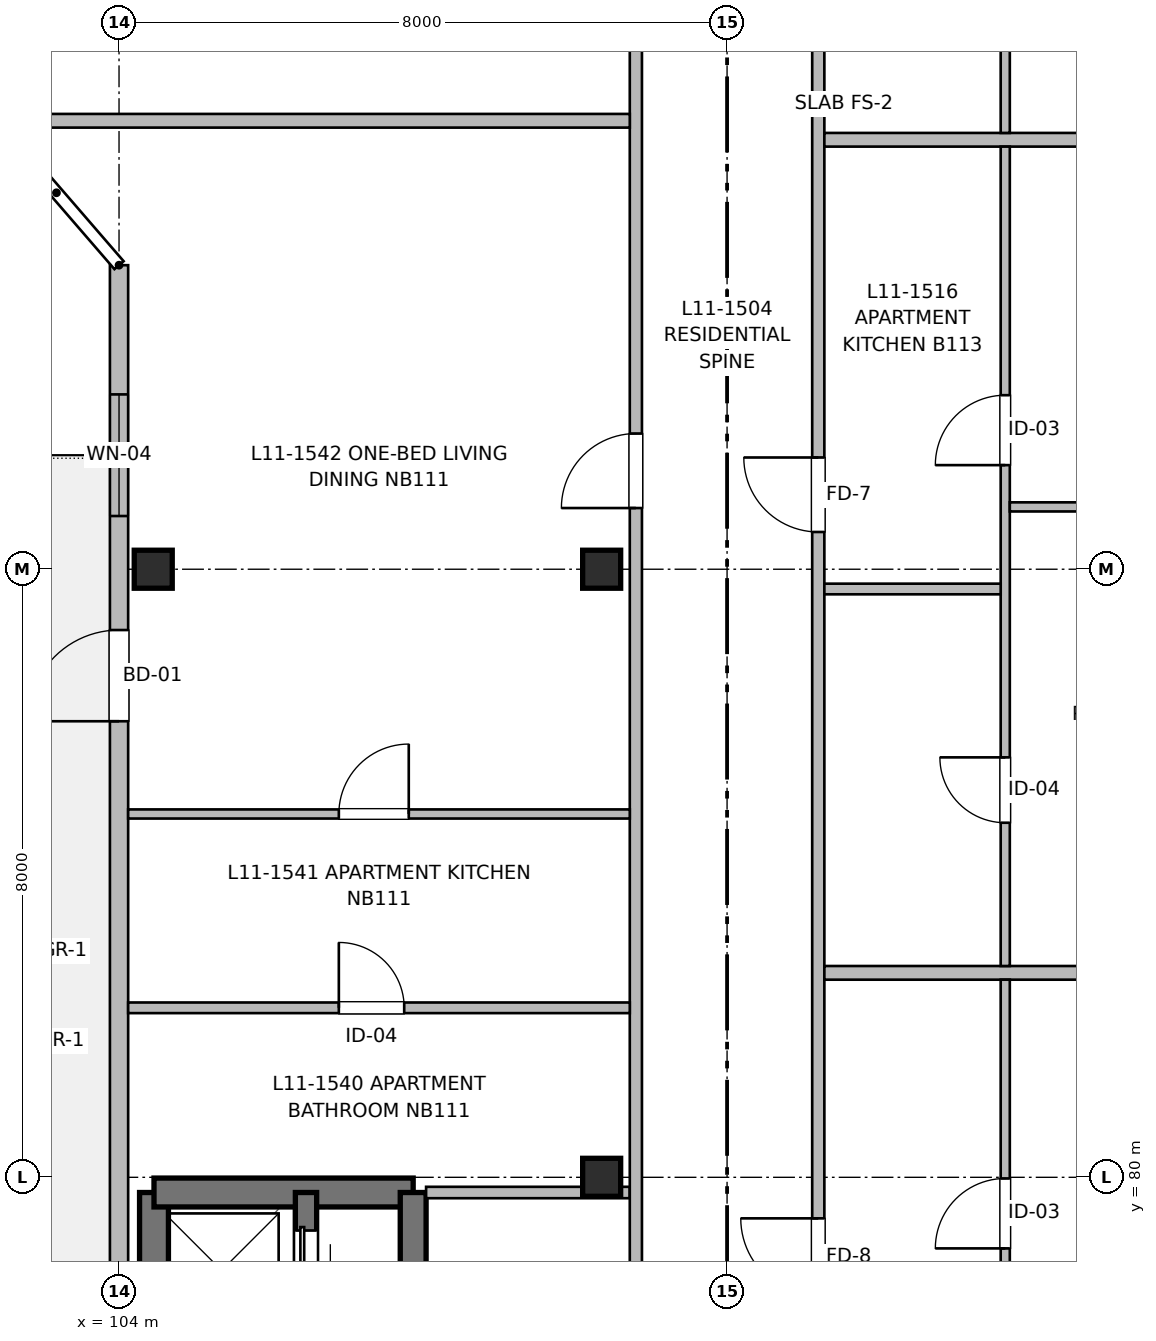
"""IFC4 building model, lengths in metres.
Left out: names, types, materials, properties, quantities, classifications, styles, units other than length and angle.
Written with IfcOpenShell. Run it as: python <this file> out.ifc"""

import sys

from ifc_helpers import new_model, si_unit, direction, frame, frame_2d, origin, origin_2d, place, context, subcontext, project, spatial, rectangle, extrude, element, fill, save


model = new_model("IFC4")
c1 = context("Model", 3, precision=1e-05, world=origin(), true_north=direction((0.0, 1.0)))
c2 = subcontext(c1, "Body", "Model", "MODEL_VIEW")
j1 = project(units=[si_unit("LENGTHUNIT", "METRE"), si_unit("PLANEANGLEUNIT", "RADIAN")], contexts=[c1])
p1 = place(None, origin())
s1 = spatial("IfcSite", under=j1, at=p1, CompositionType="ELEMENT")
p2 = place(p1, origin())
s2 = spatial("IfcBuilding", under=s1, at=p2, CompositionType="ELEMENT")
p3 = place(p2, frame((0.0, 0.0, 36.16)))
s3 = spatial("IfcBuildingStorey", under=s2, at=p3, CompositionType="ELEMENT", Elevation=36.16)
for number, where, z_axis, x_axis in (
    (1, (104.45, 88.0, 0.0), (0.0, 0.0, 1.0), (1.0, 0.0, 0.0)),
    (2, (110.35, 80.0, 0.0), (0.0, 0.0, 1.0), (1.0, 0.0, 0.0)),
    (3, (110.35, 88.0, 0.0), (0.0, 0.0, 1.0), (1.0, 0.0, 0.0)),
):
    element("IfcColumn", number, at=place(p3, frame(where, z_axis=z_axis, x_axis=x_axis)), inside=s3, PredefinedType="COLUMN", context=c2, shape_type="SweptSolid", body=[
        extrude(rectangle(XDim=0.5, YDim=0.5, at=origin_2d()), origin(), (0.0, 0.0, 1.0), 3.2),
    ])
p4 = place(p3, frame((104.46, 67.35, 0.0), z_axis=(0.0, 0.0, 1.0), x_axis=(0.0, 1.0, 0.0)))
e4 = element("IfcWall", 4, at=p4, inside=s3, PredefinedType="SHEAR", context=c2, shape_type="SweptSolid", body=[
    extrude(rectangle(XDim=12.45, YDim=0.38, at=frame_2d((6.225, 0.0))), origin(), (0.0, 0.0, 1.0), 3.2),
])
p5 = place(p4, frame((2.2, 0.0, 0.97)))
e5 = element("IfcOpeningElement", 5, at=p5, cuts=e4, PredefinedType="OPENING", context=c2, shape_type="SweptSolid", body=[
    extrude(rectangle(XDim=0.95, YDim=1.25, at=frame_2d((0.475, 0.625))), frame((0.0, 0.2, 0.0), z_axis=(0.0, -1.0, 0.0), x_axis=(1.0, 0.0, 0.0)), (0.0, 0.0, 1.0), 0.4),
])
p6 = place(p3, frame((104.46, 79.8, 0.0), z_axis=(0.0, 0.0, 1.0), x_axis=(1.0, 0.0, 0.0)))
e6 = element("IfcWall", 6, at=p6, inside=s3, PredefinedType="SHEAR", context=c2, shape_type="SweptSolid", body=[
    extrude(rectangle(XDim=3.41, YDim=0.38, at=frame_2d((1.705, 0.0))), origin(), (0.0, 0.0, 1.0), 3.2),
])
p7 = place(p3, frame((107.87, 79.8, 0.0), z_axis=(0.0, 0.0, 1.0), x_axis=(0.0, -1.0, 0.0)))
e7 = element("IfcWall", 7, at=p7, inside=s3, PredefinedType="SHEAR", context=c2, shape_type="SweptSolid", body=[
    extrude(rectangle(XDim=12.45, YDim=0.34, at=frame_2d((6.225, 0.0))), origin(), (0.0, 0.0, 1.0), 3.2),
])
p8 = place(p7, frame((10.85, 0.0, 0.0)))
e8 = element("IfcOpeningElement", 8, at=p8, cuts=e7, PredefinedType="OPENING", context=c2, shape_type="SweptSolid", body=[
    extrude(rectangle(XDim=1.05, YDim=2.15, at=frame_2d((0.525, 1.075))), frame((0.0, 0.18, 0.0), z_axis=(0.0, -1.0, 0.0), x_axis=(1.0, 0.0, 0.0)), (0.0, 0.0, 1.0), 0.36),
])
p9 = place(p3, frame((106.46, 74.55, 0.0), z_axis=(0.0, 0.0, 1.0), x_axis=(0.0, 1.0, 0.0)))
e9 = element("IfcWall", 9, at=p9, inside=s3, PredefinedType="SHEAR", context=c2, shape_type="SweptSolid", body=[
    extrude(rectangle(XDim=5.25, YDim=0.28, at=frame_2d((2.625, 0.0))), origin(), (0.0, 0.0, 1.0), 3.2),
])
p10 = place(p9, frame((1.15, 0.0, 0.0)))
e10 = element("IfcOpeningElement", 10, at=p10, cuts=e9, PredefinedType="OPENING", context=c2, shape_type="SweptSolid", body=[
    extrude(rectangle(XDim=1.0, YDim=2.15, at=frame_2d((0.5, 1.075))), frame((0.0, 0.15, 0.0), z_axis=(0.0, -1.0, 0.0), x_axis=(1.0, 0.0, 0.0)), (0.0, 0.0, 1.0), 0.3),
])
p11 = place(p9, frame((3.85, 0.0, 0.0)))
e11 = element("IfcOpeningElement", 11, at=p11, cuts=e9, PredefinedType="OPENING", context=c2, shape_type="SweptSolid", body=[
    extrude(rectangle(XDim=0.9, YDim=2.15, at=frame_2d((0.45, 1.075))), frame((0.0, 0.15, 0.0), z_axis=(0.0, -1.0, 0.0), x_axis=(1.0, 0.0, 0.0)), (0.0, 0.0, 1.0), 0.3),
])
p12 = place(p3, frame((104.0, 64.4, 0.0), z_axis=(0.0, 0.0, 1.0), x_axis=(0.0, 1.0, 0.0)))
e12 = element("IfcWall", 12, at=p12, inside=s3, PredefinedType="SOLIDWALL", context=c2, shape_type="SweptSolid", body=[
    extrude(rectangle(XDim=27.6, YDim=0.24, at=frame_2d((13.8, 0.0))), origin(), (0.0, 0.0, 1.0), 2.98),
])
p13 = place(p12, frame((3.95, 0.0, 0.82)))
e13 = element("IfcOpeningElement", 13, at=p13, cuts=e12, PredefinedType="OPENING", context=c2, shape_type="SweptSolid", body=[
    extrude(rectangle(XDim=1.3, YDim=1.4, at=frame_2d((0.65, 0.7))), frame((0.0, 0.13, 0.0), z_axis=(0.0, -1.0, 0.0), x_axis=(1.0, 0.0, 0.0)), (0.0, 0.0, 1.0), 0.26),
])
p14 = place(p12, frame((10.95, 0.0, 0.67)))
e14 = element("IfcOpeningElement", 14, at=p14, cuts=e12, PredefinedType="OPENING", context=c2, shape_type="SweptSolid", body=[
    extrude(rectangle(XDim=2.1, YDim=1.55, at=frame_2d((1.05, 0.775))), frame((0.0, 0.13, 0.0), z_axis=(0.0, -1.0, 0.0), x_axis=(1.0, 0.0, 0.0)), (0.0, 0.0, 1.0), 0.26),
])
p15 = place(p12, frame((21.6, 0.0, 0.0)))
e15 = element("IfcOpeningElement", 15, at=p15, cuts=e12, PredefinedType="OPENING", context=c2, shape_type="SweptSolid", body=[
    extrude(rectangle(XDim=1.2, YDim=2.2, at=frame_2d((0.6, 1.1))), frame((0.0, 0.13, 0.0), z_axis=(0.0, -1.0, 0.0), x_axis=(1.0, 0.0, 0.0)), (0.0, 0.0, 1.0), 0.26),
])
p16 = place(p12, frame((24.3, 0.0, 0.77)))
e16 = element("IfcOpeningElement", 16, at=p16, cuts=e12, PredefinedType="OPENING", context=c2, shape_type="SweptSolid", body=[
    extrude(rectangle(XDim=1.6, YDim=1.45, at=frame_2d((0.8, 0.725))), frame((0.0, 0.13, 0.0), z_axis=(0.0, -1.0, 0.0), x_axis=(1.0, 0.0, 0.0)), (0.0, 0.0, 1.0), 0.26),
])
p17 = place(p3, frame((108.04, 79.8, 0.0), z_axis=(0.0, 0.0, 1.0), x_axis=(1.0, 0.0, 0.0)))
e17 = element("IfcWall", 17, at=p17, inside=s3, PredefinedType="PARTITIONING", context=c2, shape_type="SweptSolid", body=[
    extrude(rectangle(XDim=2.68, YDim=0.15, at=frame_2d((1.34, 0.0))), origin(), (0.0, 0.0, 1.0), 2.935),
])
p18 = place(p3, frame((110.8, 64.56, 0.0), z_axis=(0.0, 0.0, 1.0), x_axis=(0.0, 1.0, 0.0)))
e18 = element("IfcWall", 18, at=p18, inside=s3, PredefinedType="PARTITIONING", context=c2, shape_type="SweptSolid", body=[
    extrude(rectangle(XDim=42.24, YDim=0.16, at=frame_2d((21.12, 0.0))), origin(), (0.0, 0.0, 1.0), 2.935),
])
p19 = place(p18, frame((4.44, 0.0, 0.0)))
e19 = element("IfcOpeningElement", 19, at=p19, cuts=e18, PredefinedType="OPENING", context=c2, shape_type="SweptSolid", body=[
    extrude(rectangle(XDim=1.1, YDim=2.15, at=frame_2d((0.55, 1.075))), frame((0.0, 0.09, 0.0), z_axis=(0.0, -1.0, 0.0), x_axis=(1.0, 0.0, 0.0)), (0.0, 0.0, 1.0), 0.18),
])
p20 = place(p18, frame((10.84, 0.0, 0.0)))
e20 = element("IfcOpeningElement", 20, at=p20, cuts=e18, PredefinedType="OPENING", context=c2, shape_type="SweptSolid", body=[
    extrude(rectangle(XDim=1.6, YDim=2.15, at=frame_2d((0.8, 1.075))), frame((0.0, 0.09, 0.0), z_axis=(0.0, -1.0, 0.0), x_axis=(1.0, 0.0, 0.0)), (0.0, 0.0, 1.0), 0.18),
])
p21 = place(p18, frame((24.245, 0.0, 0.0)))
e21 = element("IfcOpeningElement", 21, at=p21, cuts=e18, PredefinedType="OPENING", context=c2, shape_type="SweptSolid", body=[
    extrude(rectangle(XDim=0.98, YDim=2.15, at=frame_2d((0.49, 1.075))), frame((0.0, 0.09, 0.0), z_axis=(0.0, -1.0, 0.0), x_axis=(1.0, 0.0, 0.0)), (0.0, 0.0, 1.0), 0.18),
])
p22 = place(p18, frame((32.855, 0.0, 0.0)))
e22 = element("IfcOpeningElement", 22, at=p22, cuts=e18, PredefinedType="OPENING", context=c2, shape_type="SweptSolid", body=[
    extrude(rectangle(XDim=0.98, YDim=2.15, at=frame_2d((0.49, 1.075))), frame((0.0, 0.09, 0.0), z_axis=(0.0, -1.0, 0.0), x_axis=(1.0, 0.0, 0.0)), (0.0, 0.0, 1.0), 0.18),
])
p23 = place(p3, frame((113.2, 64.56, 0.0), z_axis=(0.0, 0.0, 1.0), x_axis=(0.0, 1.0, 0.0)))
e23 = element("IfcWall", 23, at=p23, inside=s3, PredefinedType="PARTITIONING", context=c2, shape_type="SweptSolid", body=[
    extrude(rectangle(XDim=42.24, YDim=0.16, at=frame_2d((21.12, 0.0))), origin(), (0.0, 0.0, 1.0), 2.935),
])
p24 = place(p23, frame((4.78, 0.0, 0.0)))
e24 = element("IfcOpeningElement", 24, at=p24, cuts=e23, PredefinedType="OPENING", context=c2, shape_type="SweptSolid", body=[
    extrude(rectangle(XDim=0.98, YDim=2.15, at=frame_2d((0.49, 1.075))), frame((0.0, 0.09, 0.0), z_axis=(0.0, -1.0, 0.0), x_axis=(1.0, 0.0, 0.0)), (0.0, 0.0, 1.0), 0.18),
])
p25 = place(p23, frame((13.88, 0.0, 0.0)))
e25 = element("IfcOpeningElement", 25, at=p25, cuts=e23, PredefinedType="OPENING", context=c2, shape_type="SweptSolid", body=[
    extrude(rectangle(XDim=1.02, YDim=2.15, at=frame_2d((0.51, 1.075))), frame((0.0, 0.09, 0.0), z_axis=(0.0, -1.0, 0.0), x_axis=(1.0, 0.0, 0.0)), (0.0, 0.0, 1.0), 0.18),
])
p26 = place(p23, frame((23.93, 0.0, 0.0)))
e26 = element("IfcOpeningElement", 26, at=p26, cuts=e23, PredefinedType="OPENING", context=c2, shape_type="SweptSolid", body=[
    extrude(rectangle(XDim=0.98, YDim=2.15, at=frame_2d((0.49, 1.075))), frame((0.0, 0.09, 0.0), z_axis=(0.0, -1.0, 0.0), x_axis=(1.0, 0.0, 0.0)), (0.0, 0.0, 1.0), 0.18),
])
p27 = place(p23, frame((35.9, 0.0, 0.0)))
e27 = element("IfcOpeningElement", 27, at=p27, cuts=e23, PredefinedType="OPENING", context=c2, shape_type="SweptSolid", body=[
    extrude(rectangle(XDim=0.98, YDim=2.15, at=frame_2d((0.49, 1.075))), frame((0.0, 0.09, 0.0), z_axis=(0.0, -1.0, 0.0), x_axis=(1.0, 0.0, 0.0)), (0.0, 0.0, 1.0), 0.18),
])
p28 = place(p3, frame((113.28, 82.69, 0.0), z_axis=(0.0, 0.0, 1.0), x_axis=(1.0, 0.0, 0.0)))
e28 = element("IfcWall", 28, at=p28, inside=s3, PredefinedType="PARTITIONING", context=c2, shape_type="SweptSolid", body=[
    extrude(rectangle(XDim=6.6, YDim=0.18, at=frame_2d((3.3, 0.0))), origin(), (0.0, 0.0, 1.0), 2.935),
])
p29 = place(p3, frame((113.28, 93.65, 0.0), z_axis=(0.0, 0.0, 1.0), x_axis=(1.0, 0.0, 0.0)))
e29 = element("IfcWall", 29, at=p29, inside=s3, PredefinedType="PARTITIONING", context=c2, shape_type="SweptSolid", body=[
    extrude(rectangle(XDim=11.437, YDim=0.18, at=frame_2d((5.719, 0.0))), origin(), (0.0, 0.0, 1.0), 2.935),
])
p30 = place(p3, frame((115.66, 73.5, 0.0), z_axis=(0.0, 0.0, 1.0), x_axis=(0.0, 1.0, 0.0)))
e30 = element("IfcWall", 30, at=p30, inside=s3, PredefinedType="PARTITIONING", context=c2, shape_type="SweptSolid", body=[
    extrude(rectangle(XDim=9.1, YDim=0.12, at=frame_2d((4.55, 0.0))), origin(), (0.0, 0.0, 1.0), 2.935),
])
p31 = place(p30, frame((1.592, 0.0, 0.0)))
e31 = element("IfcOpeningElement", 31, at=p31, cuts=e30, PredefinedType="OPENING", context=c2, shape_type="SweptSolid", body=[
    extrude(rectangle(XDim=0.94, YDim=2.1, at=frame_2d((0.47, 1.05))), frame((0.0, 0.07, 0.0), z_axis=(0.0, -1.0, 0.0), x_axis=(1.0, 0.0, 0.0)), (0.0, 0.0, 1.0), 0.14),
])
p32 = place(p30, frame((5.565, 0.0, 0.0)))
e32 = element("IfcOpeningElement", 32, at=p32, cuts=e30, PredefinedType="OPENING", context=c2, shape_type="SweptSolid", body=[
    extrude(rectangle(XDim=0.92, YDim=2.1, at=frame_2d((0.46, 1.05))), frame((0.0, 0.07, 0.0), z_axis=(0.0, -1.0, 0.0), x_axis=(1.0, 0.0, 0.0)), (0.0, 0.0, 1.0), 0.14),
])
p33 = place(p3, frame((115.66, 82.78, 0.0), z_axis=(0.0, 0.0, 1.0), x_axis=(0.0, 1.0, 0.0)))
e33 = element("IfcWall", 33, at=p33, inside=s3, PredefinedType="PARTITIONING", context=c2, shape_type="SweptSolid", body=[
    extrude(rectangle(XDim=10.78, YDim=0.12, at=frame_2d((5.39, 0.0))), origin(), (0.0, 0.0, 1.0), 2.935),
])
p34 = place(p33, frame((1.885, 0.0, 0.0)))
e34 = element("IfcOpeningElement", 34, at=p34, cuts=e33, PredefinedType="OPENING", context=c2, shape_type="SweptSolid", body=[
    extrude(rectangle(XDim=0.86, YDim=2.1, at=frame_2d((0.43, 1.05))), frame((0.0, 0.07, 0.0), z_axis=(0.0, -1.0, 0.0), x_axis=(1.0, 0.0, 0.0)), (0.0, 0.0, 1.0), 0.14),
])
p35 = place(p33, frame((6.59, 0.0, 0.0)))
e35 = element("IfcOpeningElement", 35, at=p35, cuts=e33, PredefinedType="OPENING", context=c2, shape_type="SweptSolid", body=[
    extrude(rectangle(XDim=0.92, YDim=2.1, at=frame_2d((0.46, 1.05))), frame((0.0, 0.07, 0.0), z_axis=(0.0, -1.0, 0.0), x_axis=(1.0, 0.0, 0.0)), (0.0, 0.0, 1.0), 0.14),
])
p36 = place(p3, frame((113.28, 87.74, 0.0), z_axis=(0.0, 0.0, 1.0), x_axis=(1.0, 0.0, 0.0)))
e36 = element("IfcWall", 36, at=p36, inside=s3, PredefinedType="PARTITIONING", context=c2, shape_type="SweptSolid", body=[
    extrude(rectangle(XDim=2.32, YDim=0.14, at=frame_2d((1.16, 0.0))), origin(), (0.0, 0.0, 1.0), 2.935),
])
p37 = place(p3, frame((115.72, 88.82, 0.0), z_axis=(0.0, 0.0, 1.0), x_axis=(1.0, 0.0, 0.0)))
e37 = element("IfcWall", 37, at=p37, inside=s3, PredefinedType="PARTITIONING", context=c2, shape_type="SweptSolid", body=[
    extrude(rectangle(XDim=4.887, YDim=0.12, at=frame_2d((2.443, 0.0))), origin(), (0.0, 0.0, 1.0), 2.935),
])
p38 = place(p37, frame((1.63, 0.0, 0.0)))
e38 = element("IfcOpeningElement", 38, at=p38, cuts=e37, PredefinedType="OPENING", context=c2, shape_type="SweptSolid", body=[
    extrude(rectangle(XDim=0.9, YDim=2.1, at=frame_2d((0.45, 1.05))), frame((0.0, 0.07, 0.0), z_axis=(0.0, -1.0, 0.0), x_axis=(1.0, 0.0, 0.0)), (0.0, 0.0, 1.0), 0.14),
])
p39 = place(p3, frame((115.66, 93.74, 0.0), z_axis=(0.0, 0.0, 1.0), x_axis=(0.0, 1.0, 0.0)))
e39 = element("IfcWall", 39, at=p39, inside=s3, PredefinedType="PARTITIONING", context=c2, shape_type="SweptSolid", body=[
    extrude(rectangle(XDim=12.98, YDim=0.12, at=frame_2d((6.49, 0.0))), origin(), (0.0, 0.0, 1.0), 2.68),
])
p40 = place(p39, frame((2.269, 0.0, 0.0)))
e40 = element("IfcOpeningElement", 40, at=p40, cuts=e39, PredefinedType="OPENING", context=c2, shape_type="SweptSolid", body=[
    extrude(rectangle(XDim=0.86, YDim=2.1, at=frame_2d((0.43, 1.05))), frame((0.0, 0.07, 0.0), z_axis=(0.0, -1.0, 0.0), x_axis=(1.0, 0.0, 0.0)), (0.0, 0.0, 1.0), 0.14),
])
p41 = place(p39, frame((7.933, 0.0, 0.0)))
e41 = element("IfcOpeningElement", 41, at=p41, cuts=e39, PredefinedType="OPENING", context=c2, shape_type="SweptSolid", body=[
    extrude(rectangle(XDim=0.92, YDim=2.1, at=frame_2d((0.46, 1.05))), frame((0.0, 0.07, 0.0), z_axis=(0.0, -1.0, 0.0), x_axis=(1.0, 0.0, 0.0)), (0.0, 0.0, 1.0), 0.14),
])
p42 = place(p3, frame((102.411, 93.9, 0.0), z_axis=(0.0, 0.0, 1.0), x_axis=(1.0, 0.0, 0.0)))
e42 = element("IfcWall", 42, at=p42, inside=s3, PredefinedType="PARTITIONING", context=c2, shape_type="SweptSolid", body=[
    extrude(rectangle(XDim=8.309, YDim=0.18, at=frame_2d((4.155, 0.0))), origin(), (0.0, 0.0, 1.0), 2.935),
])
p43 = place(p3, frame((104.12, 82.23, 0.0), z_axis=(0.0, 0.0, 1.0), x_axis=(1.0, 0.0, 0.0)))
e43 = element("IfcWall", 43, at=p43, inside=s3, PredefinedType="PARTITIONING", context=c2, shape_type="SweptSolid", body=[
    extrude(rectangle(XDim=6.6, YDim=0.14, at=frame_2d((3.3, 0.0))), origin(), (0.0, 0.0, 1.0), 2.935),
])
p44 = place(p43, frame((2.772, 0.0, 0.0)))
e44 = element("IfcOpeningElement", 44, at=p44, cuts=e43, PredefinedType="OPENING", context=c2, shape_type="SweptSolid", body=[
    extrude(rectangle(XDim=0.86, YDim=2.1, at=frame_2d((0.43, 1.05))), frame((0.0, 0.08, 0.0), z_axis=(0.0, -1.0, 0.0), x_axis=(1.0, 0.0, 0.0)), (0.0, 0.0, 1.0), 0.16),
])
p45 = place(p3, frame((104.12, 84.78, 0.0), z_axis=(0.0, 0.0, 1.0), x_axis=(1.0, 0.0, 0.0)))
e45 = element("IfcWall", 45, at=p45, inside=s3, PredefinedType="PARTITIONING", context=c2, shape_type="SweptSolid", body=[
    extrude(rectangle(XDim=6.6, YDim=0.12, at=frame_2d((3.3, 0.0))), origin(), (0.0, 0.0, 1.0), 2.935),
])
p46 = place(p45, frame((2.772, 0.0, 0.0)))
e46 = element("IfcOpeningElement", 46, at=p46, cuts=e45, PredefinedType="OPENING", context=c2, shape_type="SweptSolid", body=[
    extrude(rectangle(XDim=0.92, YDim=2.1, at=frame_2d((0.46, 1.05))), frame((0.0, 0.07, 0.0), z_axis=(0.0, -1.0, 0.0), x_axis=(1.0, 0.0, 0.0)), (0.0, 0.0, 1.0), 0.14),
])
p47 = place(p11, origin())
e47 = element("IfcDoor", 47, at=p47, inside=s3, OperationType="SLIDING_TO_RIGHT", PredefinedType="DOOR", context=c2, shape_type="SweptSolid", body=[
    extrude(rectangle(XDim=0.9, YDim=2.15, at=frame_2d((0.45, 1.075))), frame((0.0, 0.025, 0.0), z_axis=(0.0, -1.0, 0.0), x_axis=(1.0, 0.0, 0.0)), (0.0, 0.0, 1.0), 0.05),
])
fill(e11, e47)
p48 = place(p15, origin())
e48 = element("IfcDoor", 48, at=p48, inside=s3, OperationType="SINGLE_SWING_LEFT", PredefinedType="DOOR", context=c2, shape_type="SweptSolid", body=[
    extrude(rectangle(XDim=1.2, YDim=2.2, at=frame_2d((0.6, 1.1))), frame((0.0, 0.025, 0.0), z_axis=(0.0, -1.0, 0.0), x_axis=(1.0, 0.0, 0.0)), (0.0, 0.0, 1.0), 0.05),
])
fill(e15, e48)
p49 = place(p16, origin())
e49 = element("IfcWindow", 49, at=p49, inside=s3, PartitioningType="SINGLE_PANEL", PredefinedType="WINDOW", context=c2, shape_type="SweptSolid", body=[
    extrude(rectangle(XDim=1.6, YDim=1.45, at=frame_2d((0.8, 0.725))), frame((0.0, 0.03, 0.0), z_axis=(0.0, -1.0, 0.0), x_axis=(1.0, 0.0, 0.0)), (0.0, 0.0, 1.0), 0.06),
])
fill(e16, e49)
p50 = place(p32, origin())
e50 = element("IfcDoor", 50, at=p50, inside=s3, OperationType="SINGLE_SWING_LEFT", PredefinedType="DOOR", context=c2, shape_type="SweptSolid", body=[
    extrude(rectangle(XDim=0.92, YDim=2.1, at=frame_2d((0.46, 1.05))), frame((0.0, 0.025, 0.0), z_axis=(0.0, -1.0, 0.0), x_axis=(1.0, 0.0, 0.0)), (0.0, 0.0, 1.0), 0.05),
])
fill(e32, e50)
p51 = place(p25, origin())
e51 = element("IfcDoor", 51, at=p51, inside=s3, OperationType="SINGLE_SWING_RIGHT", PredefinedType="DOOR", context=c2, shape_type="SweptSolid", body=[
    extrude(rectangle(XDim=1.02, YDim=2.15, at=frame_2d((0.51, 1.075))), frame((0.0, 0.025, 0.0), z_axis=(0.0, -1.0, 0.0), x_axis=(1.0, 0.0, 0.0)), (0.0, 0.0, 1.0), 0.05),
])
fill(e25, e51)
p52 = place(p34, origin())
e52 = element("IfcDoor", 52, at=p52, inside=s3, OperationType="SINGLE_SWING_RIGHT", PredefinedType="DOOR", context=c2, shape_type="SweptSolid", body=[
    extrude(rectangle(XDim=0.86, YDim=2.1, at=frame_2d((0.43, 1.05))), frame((0.0, 0.025, 0.0), z_axis=(0.0, -1.0, 0.0), x_axis=(1.0, 0.0, 0.0)), (0.0, 0.0, 1.0), 0.05),
])
fill(e34, e52)
p53 = place(p35, origin())
e53 = element("IfcDoor", 53, at=p53, inside=s3, OperationType="SINGLE_SWING_LEFT", PredefinedType="DOOR", context=c2, shape_type="SweptSolid", body=[
    extrude(rectangle(XDim=0.92, YDim=2.1, at=frame_2d((0.46, 1.05))), frame((0.0, 0.025, 0.0), z_axis=(0.0, -1.0, 0.0), x_axis=(1.0, 0.0, 0.0)), (0.0, 0.0, 1.0), 0.05),
])
fill(e35, e53)
p54 = place(p26, origin())
e54 = element("IfcDoor", 54, at=p54, inside=s3, OperationType="SINGLE_SWING_RIGHT", PredefinedType="DOOR", context=c2, shape_type="SweptSolid", body=[
    extrude(rectangle(XDim=0.98, YDim=2.15, at=frame_2d((0.49, 1.075))), frame((0.0, 0.025, 0.0), z_axis=(0.0, -1.0, 0.0), x_axis=(1.0, 0.0, 0.0)), (0.0, 0.0, 1.0), 0.05),
])
fill(e26, e54)
p55 = place(p44, origin())
e55 = element("IfcDoor", 55, at=p55, inside=s3, OperationType="SINGLE_SWING_LEFT", PredefinedType="DOOR", context=c2, shape_type="SweptSolid", body=[
    extrude(rectangle(XDim=0.86, YDim=2.1, at=frame_2d((0.43, 1.05))), frame((0.0, 0.025, 0.0), z_axis=(0.0, -1.0, 0.0), x_axis=(1.0, 0.0, 0.0)), (0.0, 0.0, 1.0), 0.05),
])
fill(e44, e55)
p56 = place(p46, origin())
e56 = element("IfcDoor", 56, at=p56, inside=s3, OperationType="SINGLE_SWING_RIGHT", PredefinedType="DOOR", context=c2, shape_type="SweptSolid", body=[
    extrude(rectangle(XDim=0.92, YDim=2.1, at=frame_2d((0.46, 1.05))), frame((0.0, 0.025, 0.0), z_axis=(0.0, -1.0, 0.0), x_axis=(1.0, 0.0, 0.0)), (0.0, 0.0, 1.0), 0.05),
])
fill(e46, e56)
p57 = place(p21, origin())
e57 = element("IfcDoor", 57, at=p57, inside=s3, OperationType="SINGLE_SWING_LEFT", PredefinedType="DOOR", context=c2, shape_type="SweptSolid", body=[
    extrude(rectangle(XDim=0.98, YDim=2.15, at=frame_2d((0.49, 1.075))), frame((0.0, 0.025, 0.0), z_axis=(0.0, -1.0, 0.0), x_axis=(1.0, 0.0, 0.0)), (0.0, 0.0, 1.0), 0.05),
])
fill(e21, e57)
save(model, sys.argv[1])
